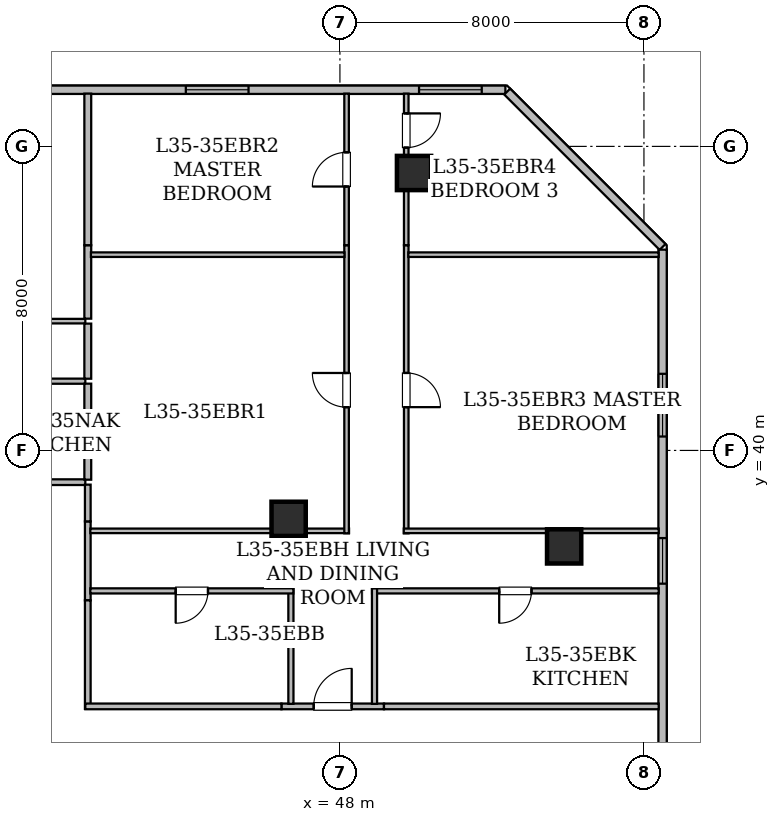
"""IFC4 building model, lengths in metres.
Left out: names, types, materials, properties, quantities, classifications, styles, units other than length and angle.
Written with IfcOpenShell. Run it as: python <this file> out.ifc"""

import sys

from ifc_helpers import new_model, si_unit, direction, frame, frame_2d, origin, origin_2d, place, context, subcontext, project, spatial, rectangle, hollow_rectangle, extrude, element, fill, save


model = new_model("IFC4")
c1 = context("Model", 3, precision=1e-05, world=origin(), true_north=direction((0.0, 1.0)))
c2 = subcontext(c1, "Body", "Model", "MODEL_VIEW")
j1 = project(units=[si_unit("LENGTHUNIT", "METRE"), si_unit("PLANEANGLEUNIT", "RADIAN")], contexts=[c1])
p1 = place(None, origin())
s1 = spatial("IfcSite", under=j1, at=p1, CompositionType="ELEMENT")
p2 = place(p1, origin())
s2 = spatial("IfcBuilding", under=s1, at=p2, CompositionType="ELEMENT")
p3 = place(p2, frame((0.0, 0.0, 138.4)))
s3 = spatial("IfcBuildingStorey", under=s2, at=p3, CompositionType="ELEMENT", Elevation=138.4)
for number, where, z_axis, x_axis in (
    (1, (49.95, 47.3, 0.0), (0.0, 0.0, 1.0), (1.0, 0.0, 0.0)),
    (2, (53.9, 37.475, 0.0), (0.0, 0.0, 1.0), (1.0, 0.0, 0.0)),
    (3, (46.65, 38.2, 0.0), (0.0, 0.0, 1.0), (1.0, 0.0, 0.0)),
):
    element("IfcColumn", number, at=place(p3, frame(where, z_axis=z_axis, x_axis=x_axis)), inside=s3, PredefinedType="COLUMN", context=c2, shape_type="SweptSolid", body=[
        extrude(hollow_rectangle(XDim=0.9, YDim=0.9, WallThickness=0.045, at=origin_2d()), origin(), (0.0, 0.0, 1.0), 3.65),
    ])
p4 = place(p3, frame((13.715, 49.49, 0.0), z_axis=(0.0, 0.0, 1.0), x_axis=(1.0, 0.0, 0.0)))
e4 = element("IfcWall", 4, at=p4, inside=s3, PredefinedType="STANDARD", context=c2, shape_type="SweptSolid", body=[
    extrude(rectangle(XDim=38.639, YDim=0.22, at=frame_2d((19.319, 0.0))), origin(), (0.0, 0.0, 1.0), 3.43),
])
p5 = place(p4, frame((2.243, 0.0, 0.85)))
e5 = element("IfcOpeningElement", 5, at=p5, cuts=e4, PredefinedType="OPENING", context=c2, shape_type="SweptSolid", body=[
    extrude(rectangle(XDim=1.65, YDim=1.55, at=frame_2d((0.825, 0.775))), frame((0.0, 0.12, 0.0), z_axis=(0.0, -1.0, 0.0), x_axis=(1.0, 0.0, 0.0)), (0.0, 0.0, 1.0), 0.24),
])
p6 = place(p4, frame((8.455, 0.0, 0.8)))
e6 = element("IfcOpeningElement", 6, at=p6, cuts=e4, PredefinedType="OPENING", context=c2, shape_type="SweptSolid", body=[
    extrude(rectangle(XDim=1.2, YDim=1.5, at=frame_2d((0.6, 0.75))), frame((0.0, 0.12, 0.0), z_axis=(0.0, -1.0, 0.0), x_axis=(1.0, 0.0, 0.0)), (0.0, 0.0, 1.0), 0.24),
])
p7 = place(p4, frame((5.805, 0.0, 0.85)))
e7 = element("IfcOpeningElement", 7, at=p7, cuts=e4, PredefinedType="OPENING", context=c2, shape_type="SweptSolid", body=[
    extrude(rectangle(XDim=1.65, YDim=1.55, at=frame_2d((0.825, 0.775))), frame((0.0, 0.12, 0.0), z_axis=(0.0, -1.0, 0.0), x_axis=(1.0, 0.0, 0.0)), (0.0, 0.0, 1.0), 0.24),
])
p8 = place(p4, frame((10.655, 0.0, 0.85)))
e8 = element("IfcOpeningElement", 8, at=p8, cuts=e4, PredefinedType="OPENING", context=c2, shape_type="SweptSolid", body=[
    extrude(rectangle(XDim=1.65, YDim=1.55, at=frame_2d((0.825, 0.775))), frame((0.0, 0.12, 0.0), z_axis=(0.0, -1.0, 0.0), x_axis=(1.0, 0.0, 0.0)), (0.0, 0.0, 1.0), 0.24),
])
p9 = place(p4, frame((16.851, 0.0, 0.85)))
e9 = element("IfcOpeningElement", 9, at=p9, cuts=e4, PredefinedType="OPENING", context=c2, shape_type="SweptSolid", body=[
    extrude(rectangle(XDim=1.65, YDim=1.55, at=frame_2d((0.825, 0.775))), frame((0.0, 0.12, 0.0), z_axis=(0.0, -1.0, 0.0), x_axis=(1.0, 0.0, 0.0)), (0.0, 0.0, 1.0), 0.24),
])
p10 = place(p4, frame((24.116, 0.0, 0.85)))
e10 = element("IfcOpeningElement", 10, at=p10, cuts=e4, PredefinedType="OPENING", context=c2, shape_type="SweptSolid", body=[
    extrude(rectangle(XDim=1.65, YDim=1.55, at=frame_2d((0.825, 0.775))), frame((0.0, 0.12, 0.0), z_axis=(0.0, -1.0, 0.0), x_axis=(1.0, 0.0, 0.0)), (0.0, 0.0, 1.0), 0.24),
])
p11 = place(p4, frame((30.23, 0.0, 0.85)))
e11 = element("IfcOpeningElement", 11, at=p11, cuts=e4, PredefinedType="OPENING", context=c2, shape_type="SweptSolid", body=[
    extrude(rectangle(XDim=1.65, YDim=1.55, at=frame_2d((0.825, 0.775))), frame((0.0, 0.12, 0.0), z_axis=(0.0, -1.0, 0.0), x_axis=(1.0, 0.0, 0.0)), (0.0, 0.0, 1.0), 0.24),
])
p12 = place(p4, frame((36.367, 0.0, 0.85)))
e12 = element("IfcOpeningElement", 12, at=p12, cuts=e4, PredefinedType="OPENING", context=c2, shape_type="SweptSolid", body=[
    extrude(rectangle(XDim=1.65, YDim=1.55, at=frame_2d((0.825, 0.775))), frame((0.0, 0.12, 0.0), z_axis=(0.0, -1.0, 0.0), x_axis=(1.0, 0.0, 0.0)), (0.0, 0.0, 1.0), 0.24),
])
p13 = place(p3, frame((52.402, 49.442, 0.0), z_axis=(0.0, 0.0, 1.0), x_axis=(0.707106781187, -0.707106781187, 0.0)))
e13 = element("IfcWall", 13, at=p13, inside=s3, PredefinedType="STANDARD", context=c2, shape_type="SweptSolid", body=[
    extrude(rectangle(XDim=5.781, YDim=0.22, at=frame_2d((2.891, 0.0))), origin(), (0.0, 0.0, 1.0), 3.43),
])
p14 = place(p3, frame((56.49, 45.283, 0.0), z_axis=(0.0, 0.0, 1.0), x_axis=(0.0, -1.0, 0.0)))
e14 = element("IfcWall", 14, at=p14, inside=s3, PredefinedType="STANDARD", context=c2, shape_type="SweptSolid", body=[
    extrude(rectangle(XDim=14.046, YDim=0.22, at=frame_2d((7.023, 0.0))), origin(), (0.0, 0.0, 1.0), 3.43),
])
p15 = place(p14, frame((7.589, 0.0, 0.8)))
e15 = element("IfcOpeningElement", 15, at=p15, cuts=e14, PredefinedType="OPENING", context=c2, shape_type="SweptSolid", body=[
    extrude(rectangle(XDim=1.2, YDim=1.5, at=frame_2d((0.6, 0.75))), frame((0.0, 0.12, 0.0), z_axis=(0.0, -1.0, 0.0), x_axis=(1.0, 0.0, 0.0)), (0.0, 0.0, 1.0), 0.24),
])
p16 = place(p14, frame((3.267, 0.0, 0.85)))
e16 = element("IfcOpeningElement", 16, at=p16, cuts=e14, PredefinedType="OPENING", context=c2, shape_type="SweptSolid", body=[
    extrude(rectangle(XDim=1.65, YDim=1.55, at=frame_2d((0.825, 0.775))), frame((0.0, 0.12, 0.0), z_axis=(0.0, -1.0, 0.0), x_axis=(1.0, 0.0, 0.0)), (0.0, 0.0, 1.0), 0.24),
])
p17 = place(p3, frame((34.299, 39.165, 0.0), z_axis=(0.0, 0.0, 1.0), x_axis=(1.0, 0.0, 0.0)))
e17 = element("IfcWall", 17, at=p17, inside=s3, PredefinedType="STANDARD", context=c2, shape_type="SweptSolid", body=[
    extrude(rectangle(XDim=7.001, YDim=0.15, at=frame_2d((3.5, 0.0))), origin(), (0.0, 0.0, 1.0), 2.647),
])
p18 = place(p3, frame((41.365, 38.133, 0.0), z_axis=(0.0, 0.0, 1.0), x_axis=(0.0, -1.0, 0.0)))
e18 = element("IfcWall", 18, at=p18, inside=s3, PredefinedType="STANDARD", context=c2, shape_type="SweptSolid", body=[
    extrude(rectangle(XDim=2.078, YDim=0.15, at=frame_2d((1.039, 0.0))), origin(), (0.0, 0.0, 1.0), 2.647),
])
p19 = place(p3, frame((46.461, 33.265, 0.0), z_axis=(0.0, 0.0, 1.0), x_axis=(1.0, 0.0, 0.0)))
e19 = element("IfcWall", 19, at=p19, inside=s3, PredefinedType="STANDARD", context=c2, shape_type="SweptSolid", body=[
    extrude(rectangle(XDim=2.698, YDim=0.15, at=frame_2d((1.349, 0.0))), origin(), (0.0, 0.0, 1.0), 2.647),
])
p20 = place(p19, frame((0.849, 0.0, 0.0)))
e20 = element("IfcOpeningElement", 20, at=p20, cuts=e19, PredefinedType="OPENING", context=c2, shape_type="SweptSolid", body=[
    extrude(rectangle(XDim=1.0, YDim=2.15, at=frame_2d((0.5, 1.075))), frame((0.0, 0.085, 0.0), z_axis=(0.0, -1.0, 0.0), x_axis=(1.0, 0.0, 0.0)), (0.0, 0.0, 1.0), 0.17),
])
p21 = place(p3, frame((41.365, 36.055, 0.0), z_axis=(0.0, 0.0, 1.0), x_axis=(0.0, -1.0, 0.0)))
e21 = element("IfcWall", 21, at=p21, inside=s3, PredefinedType="STANDARD", context=c2, shape_type="SweptSolid", body=[
    extrude(rectangle(XDim=2.855, YDim=0.15, at=frame_2d((1.427, 0.0))), origin(), (0.0, 0.0, 1.0), 3.43),
])
p22 = place(p3, frame((41.3, 33.265, 0.0), z_axis=(0.0, 0.0, 1.0), x_axis=(1.0, 0.0, 0.0)))
e22 = element("IfcWall", 22, at=p22, inside=s3, PredefinedType="STANDARD", context=c2, shape_type="SweptSolid", body=[
    extrude(rectangle(XDim=5.161, YDim=0.15, at=frame_2d((2.581, 0.0))), origin(), (0.0, 0.0, 1.0), 2.647),
])
p23 = place(p3, frame((49.159, 33.265, 0.0), z_axis=(0.0, 0.0, 1.0), x_axis=(1.0, 0.0, 0.0)))
e23 = element("IfcWall", 23, at=p23, inside=s3, PredefinedType="STANDARD", context=c2, shape_type="SweptSolid", body=[
    extrude(rectangle(XDim=7.229, YDim=0.15, at=frame_2d((3.615, 0.0))), origin(), (0.0, 0.0, 1.0), 2.876),
])
p24 = place(p3, frame((41.365, 39.1, 0.0), z_axis=(0.0, 0.0, 1.0), x_axis=(0.0, -1.0, 0.0)))
e24 = element("IfcWall", 24, at=p24, inside=s3, PredefinedType="STANDARD", context=c2, shape_type="SweptSolid", body=[
    extrude(rectangle(XDim=0.967, YDim=0.15, at=frame_2d((0.483, 0.0))), origin(), (0.0, 0.0, 1.0), 3.43),
])
p25 = place(p3, frame((41.3, 41.822, 0.0), z_axis=(0.0, 0.0, 1.0), x_axis=(-1.0, 0.0, 0.0)))
e25 = element("IfcWall", 25, at=p25, inside=s3, PredefinedType="PARTITIONING", context=c2, shape_type="SweptSolid", body=[
    extrude(rectangle(XDim=7.315, YDim=0.135, at=frame_2d((3.657, 0.0))), origin(), (0.0, 0.0, 1.0), 2.647),
])
p26 = place(p25, frame((3.233, 0.0, 0.0)))
e26 = element("IfcOpeningElement", 26, at=p26, cuts=e25, PredefinedType="OPENING", context=c2, shape_type="SweptSolid", body=[
    extrude(rectangle(XDim=0.85, YDim=2.1, at=frame_2d((0.425, 1.05))), frame((0.0, 0.077, 0.0), z_axis=(0.0, -1.0, 0.0), x_axis=(1.0, 0.0, 0.0)), (0.0, 0.0, 1.0), 0.155),
])
p27 = place(p3, frame((36.196, 43.402, 0.0), z_axis=(0.0, 0.0, 1.0), x_axis=(1.0, 0.0, 0.0)))
e27 = element("IfcWall", 27, at=p27, inside=s3, PredefinedType="PARTITIONING", context=c2, shape_type="SweptSolid", body=[
    extrude(rectangle(XDim=5.104, YDim=0.12, at=frame_2d((2.552, 0.0))), origin(), (0.0, 0.0, 1.0), 2.647),
])
p28 = place(p27, frame((2.102, 0.0, 0.0)))
e28 = element("IfcOpeningElement", 28, at=p28, cuts=e27, PredefinedType="OPENING", context=c2, shape_type="SweptSolid", body=[
    extrude(rectangle(XDim=0.9, YDim=2.1, at=frame_2d((0.45, 1.05))), frame((0.0, 0.07, 0.0), z_axis=(0.0, -1.0, 0.0), x_axis=(1.0, 0.0, 0.0)), (0.0, 0.0, 1.0), 0.14),
])
p29 = place(p3, frame((41.365, 43.337, 0.0), z_axis=(0.0, 0.0, 1.0), x_axis=(0.0, -1.0, 0.0)))
e29 = element("IfcWall", 29, at=p29, inside=s3, PredefinedType="STANDARD", context=c2, shape_type="SweptSolid", body=[
    extrude(rectangle(XDim=1.45, YDim=0.18, at=frame_2d((0.725, 0.0))), origin(), (0.0, 0.0, 1.0), 3.43),
])
p30 = place(p3, frame((41.365, 41.757, 0.0), z_axis=(0.0, 0.0, 1.0), x_axis=(0.0, -1.0, 0.0)))
e30 = element("IfcWall", 30, at=p30, inside=s3, PredefinedType="STANDARD", context=c2, shape_type="SweptSolid", body=[
    extrude(rectangle(XDim=2.527, YDim=0.18, at=frame_2d((1.264, 0.0))), origin(), (0.0, 0.0, 1.0), 3.43),
])
p31 = place(p3, frame((41.365, 45.4, 0.0), z_axis=(0.0, 0.0, 1.0), x_axis=(0.0, -1.0, 0.0)))
e31 = element("IfcWall", 31, at=p31, inside=s3, PredefinedType="STANDARD", context=c2, shape_type="SweptSolid", body=[
    extrude(rectangle(XDim=1.933, YDim=0.18, at=frame_2d((0.966, 0.0))), origin(), (0.0, 0.0, 1.0), 3.43),
])
p32 = place(p3, frame((41.365, 49.388, 0.0), z_axis=(0.0, 0.0, 1.0), x_axis=(0.0, -1.0, 0.0)))
e32 = element("IfcWall", 32, at=p32, inside=s3, PredefinedType="STANDARD", context=c2, shape_type="SweptSolid", body=[
    extrude(rectangle(XDim=3.988, YDim=0.18, at=frame_2d((1.994, 0.0))), origin(), (0.0, 0.0, 1.0), 2.876),
])
p33 = place(p3, frame((46.71, 33.332, 0.0), z_axis=(0.0, 0.0, 1.0), x_axis=(0.0, 1.0, 0.0)))
e33 = element("IfcWall", 33, at=p33, inside=s3, PredefinedType="PARTITIONING", context=c2, shape_type="SweptSolid", body=[
    extrude(rectangle(XDim=3.037, YDim=0.135, at=frame_2d((1.519, 0.0))), origin(), (0.0, 0.0, 1.0), 2.647),
])
p34 = place(p3, frame((46.775, 36.304, 0.0), z_axis=(0.0, 0.0, 1.0), x_axis=(-1.0, 0.0, 0.0)))
e34 = element("IfcWall", 34, at=p34, inside=s3, PredefinedType="PARTITIONING", context=c2, shape_type="SweptSolid", body=[
    extrude(rectangle(XDim=5.343, YDim=0.135, at=frame_2d((2.671, 0.0))), origin(), (0.0, 0.0, 1.0), 2.647),
])
p35 = place(p34, frame((2.247, 0.0, 0.0)))
e35 = element("IfcOpeningElement", 35, at=p35, cuts=e34, PredefinedType="OPENING", context=c2, shape_type="SweptSolid", body=[
    extrude(rectangle(XDim=0.85, YDim=2.1, at=frame_2d((0.425, 1.05))), frame((0.0, 0.077, 0.0), z_axis=(0.0, -1.0, 0.0), x_axis=(1.0, 0.0, 0.0)), (0.0, 0.0, 1.0), 0.155),
])
p36 = place(p3, frame((56.388, 36.304, 0.0), z_axis=(0.0, 0.0, 1.0), x_axis=(-1.0, 0.0, 0.0)))
e36 = element("IfcWall", 36, at=p36, inside=s3, PredefinedType="PARTITIONING", context=c2, shape_type="SweptSolid", body=[
    extrude(rectangle(XDim=7.543, YDim=0.135, at=frame_2d((3.771, 0.0))), origin(), (0.0, 0.0, 1.0), 2.876),
])
p37 = place(p36, frame((3.347, 0.0, 0.0)))
e37 = element("IfcOpeningElement", 37, at=p37, cuts=e36, PredefinedType="OPENING", context=c2, shape_type="SweptSolid", body=[
    extrude(rectangle(XDim=0.85, YDim=2.1, at=frame_2d((0.425, 1.05))), frame((0.0, 0.077, 0.0), z_axis=(0.0, -1.0, 0.0), x_axis=(1.0, 0.0, 0.0)), (0.0, 0.0, 1.0), 0.155),
])
p38 = place(p3, frame((48.91, 36.369, 0.0), z_axis=(0.0, 0.0, 1.0), x_axis=(0.0, -1.0, 0.0)))
e38 = element("IfcWall", 38, at=p38, inside=s3, PredefinedType="PARTITIONING", context=c2, shape_type="SweptSolid", body=[
    extrude(rectangle(XDim=3.037, YDim=0.135, at=frame_2d((1.519, 0.0))), origin(), (0.0, 0.0, 1.0), 3.43),
])
p39 = place(p3, frame((41.432, 37.884, 0.0), z_axis=(0.0, 0.0, 1.0), x_axis=(1.0, 0.0, 0.0)))
e39 = element("IfcWall", 39, at=p39, inside=s3, PredefinedType="PARTITIONING", context=c2, shape_type="SweptSolid", body=[
    extrude(rectangle(XDim=6.808, YDim=0.12, at=frame_2d((3.404, 0.0))), origin(), (0.0, 0.0, 1.0), 2.647),
])
p40 = place(p3, frame((48.175, 37.819, 0.0), z_axis=(0.0, 0.0, 1.0), x_axis=(0.0, 1.0, 0.0)))
e40 = element("IfcWall", 40, at=p40, inside=s3, PredefinedType="PARTITIONING", context=c2, shape_type="SweptSolid", body=[
    extrude(rectangle(XDim=7.581, YDim=0.12, at=frame_2d((3.791, 0.0))), origin(), (0.0, 0.0, 1.0), 2.647),
])
p41 = place(p40, frame((3.319, 0.0, 0.0)))
e41 = element("IfcOpeningElement", 41, at=p41, cuts=e40, PredefinedType="OPENING", context=c2, shape_type="SweptSolid", body=[
    extrude(rectangle(XDim=0.9, YDim=2.1, at=frame_2d((0.45, 1.05))), frame((0.0, 0.07, 0.0), z_axis=(0.0, -1.0, 0.0), x_axis=(1.0, 0.0, 0.0)), (0.0, 0.0, 1.0), 0.14),
])
p42 = place(p3, frame((48.175, 45.4, 0.0), z_axis=(0.0, 0.0, 1.0), x_axis=(0.0, 1.0, 0.0)))
e42 = element("IfcWall", 42, at=p42, inside=s3, PredefinedType="PARTITIONING", context=c2, shape_type="SweptSolid", body=[
    extrude(rectangle(XDim=3.988, YDim=0.12, at=frame_2d((1.994, 0.0))), origin(), (0.0, 0.0, 1.0), 2.876),
])
p43 = place(p42, frame((1.544, 0.0, 0.0)))
e43 = element("IfcOpeningElement", 43, at=p43, cuts=e42, PredefinedType="OPENING", context=c2, shape_type="SweptSolid", body=[
    extrude(rectangle(XDim=0.9, YDim=2.1, at=frame_2d((0.45, 1.05))), frame((0.0, 0.07, 0.0), z_axis=(0.0, -1.0, 0.0), x_axis=(1.0, 0.0, 0.0)), (0.0, 0.0, 1.0), 0.14),
])
p44 = place(p3, frame((49.745, 45.4, 0.0), z_axis=(0.0, 0.0, 1.0), x_axis=(0.0, -1.0, 0.0)))
e44 = element("IfcWall", 44, at=p44, inside=s3, PredefinedType="PARTITIONING", context=c2, shape_type="SweptSolid", body=[
    extrude(rectangle(XDim=7.581, YDim=0.12, at=frame_2d((3.791, 0.0))), origin(), (0.0, 0.0, 1.0), 2.647),
])
p45 = place(p44, frame((3.361, 0.0, 0.0)))
e45 = element("IfcOpeningElement", 45, at=p45, cuts=e44, PredefinedType="OPENING", context=c2, shape_type="SweptSolid", body=[
    extrude(rectangle(XDim=0.9, YDim=2.1, at=frame_2d((0.45, 1.05))), frame((0.0, 0.07, 0.0), z_axis=(0.0, -1.0, 0.0), x_axis=(1.0, 0.0, 0.0)), (0.0, 0.0, 1.0), 0.14),
])
p46 = place(p3, frame((49.68, 37.884, 0.0), z_axis=(0.0, 0.0, 1.0), x_axis=(1.0, 0.0, 0.0)))
e46 = element("IfcWall", 46, at=p46, inside=s3, PredefinedType="PARTITIONING", context=c2, shape_type="SweptSolid", body=[
    extrude(rectangle(XDim=6.708, YDim=0.12, at=frame_2d((3.354, 0.0))), origin(), (0.0, 0.0, 1.0), 2.647),
])
p47 = place(p3, frame((49.745, 49.388, 0.0), z_axis=(0.0, 0.0, 1.0), x_axis=(0.0, -1.0, 0.0)))
e47 = element("IfcWall", 47, at=p47, inside=s3, PredefinedType="PARTITIONING", context=c2, shape_type="SweptSolid", body=[
    extrude(rectangle(XDim=3.988, YDim=0.12, at=frame_2d((1.994, 0.0))), origin(), (0.0, 0.0, 1.0), 2.647),
])
p48 = place(p47, frame((0.52, 0.0, 0.0)))
e48 = element("IfcOpeningElement", 48, at=p48, cuts=e47, PredefinedType="OPENING", context=c2, shape_type="SweptSolid", body=[
    extrude(rectangle(XDim=0.9, YDim=2.1, at=frame_2d((0.45, 1.05))), frame((0.0, 0.07, 0.0), z_axis=(0.0, -1.0, 0.0), x_axis=(1.0, 0.0, 0.0)), (0.0, 0.0, 1.0), 0.14),
])
p49 = place(p3, frame((41.447, 45.151, 0.0), z_axis=(0.0, 0.0, 1.0), x_axis=(1.0, 0.0, 0.0)))
e49 = element("IfcWall", 49, at=p49, inside=s3, PredefinedType="PARTITIONING", context=c2, shape_type="SweptSolid", body=[
    extrude(rectangle(XDim=6.674, YDim=0.12, at=frame_2d((3.337, 0.0))), origin(), (0.0, 0.0, 1.0), 3.43),
])
p50 = place(p3, frame((49.799, 45.151, 0.0), z_axis=(0.0, 0.0, 1.0), x_axis=(1.0, 0.0, 0.0)))
e50 = element("IfcWall", 50, at=p50, inside=s3, PredefinedType="PARTITIONING", context=c2, shape_type="SweptSolid", body=[
    extrude(rectangle(XDim=6.589, YDim=0.12, at=frame_2d((3.294, 0.0))), origin(), (0.0, 0.0, 1.0), 2.876),
])
p51 = place(p15, origin())
e51 = element("IfcWindow", 51, at=p51, inside=s3, PartitioningType="SINGLE_PANEL", PredefinedType="WINDOW", context=c2, shape_type="SweptSolid", body=[
    extrude(rectangle(XDim=1.2, YDim=1.5, at=frame_2d((0.6, 0.75))), frame((0.0, 0.03, 0.0), z_axis=(0.0, -1.0, 0.0), x_axis=(1.0, 0.0, 0.0)), (0.0, 0.0, 1.0), 0.06),
])
fill(e15, e51)
p52 = place(p11, origin())
e52 = element("IfcWindow", 52, at=p52, inside=s3, PartitioningType="SINGLE_PANEL", PredefinedType="WINDOW", context=c2, shape_type="SweptSolid", body=[
    extrude(rectangle(XDim=1.65, YDim=1.55, at=frame_2d((0.825, 0.775))), frame((0.0, 0.03, 0.0), z_axis=(0.0, -1.0, 0.0), x_axis=(1.0, 0.0, 0.0)), (0.0, 0.0, 1.0), 0.06),
])
fill(e11, e52)
p53 = place(p16, origin())
e53 = element("IfcWindow", 53, at=p53, inside=s3, PartitioningType="SINGLE_PANEL", PredefinedType="WINDOW", context=c2, shape_type="SweptSolid", body=[
    extrude(rectangle(XDim=1.65, YDim=1.55, at=frame_2d((0.825, 0.775))), frame((0.0, 0.03, 0.0), z_axis=(0.0, -1.0, 0.0), x_axis=(1.0, 0.0, 0.0)), (0.0, 0.0, 1.0), 0.06),
])
fill(e16, e53)
p54 = place(p12, origin())
e54 = element("IfcWindow", 54, at=p54, inside=s3, PartitioningType="SINGLE_PANEL", PredefinedType="WINDOW", context=c2, shape_type="SweptSolid", body=[
    extrude(rectangle(XDim=1.65, YDim=1.55, at=frame_2d((0.825, 0.775))), frame((0.0, 0.03, 0.0), z_axis=(0.0, -1.0, 0.0), x_axis=(1.0, 0.0, 0.0)), (0.0, 0.0, 1.0), 0.06),
])
fill(e12, e54)
p55 = place(p20, origin())
e55 = element("IfcDoor", 55, at=p55, inside=s3, OperationType="SINGLE_SWING_RIGHT", PredefinedType="DOOR", context=c2, shape_type="SweptSolid", body=[
    extrude(rectangle(XDim=1.0, YDim=2.15, at=frame_2d((0.5, 1.075))), frame((0.0, 0.025, 0.0), z_axis=(0.0, -1.0, 0.0), x_axis=(1.0, 0.0, 0.0)), (0.0, 0.0, 1.0), 0.05),
])
fill(e20, e55)
p56 = place(p35, origin())
e56 = element("IfcDoor", 56, at=p56, inside=s3, OperationType="SINGLE_SWING_RIGHT", PredefinedType="DOOR", context=c2, shape_type="SweptSolid", body=[
    extrude(rectangle(XDim=0.85, YDim=2.1, at=frame_2d((0.425, 1.05))), frame((0.0, 0.025, 0.0), z_axis=(0.0, -1.0, 0.0), x_axis=(1.0, 0.0, 0.0)), (0.0, 0.0, 1.0), 0.05),
])
fill(e35, e56)
p57 = place(p37, origin())
e57 = element("IfcDoor", 57, at=p57, inside=s3, OperationType="SINGLE_SWING_RIGHT", PredefinedType="DOOR", context=c2, shape_type="SweptSolid", body=[
    extrude(rectangle(XDim=0.85, YDim=2.1, at=frame_2d((0.425, 1.05))), frame((0.0, 0.025, 0.0), z_axis=(0.0, -1.0, 0.0), x_axis=(1.0, 0.0, 0.0)), (0.0, 0.0, 1.0), 0.05),
])
fill(e37, e57)
p58 = place(p41, origin())
e58 = element("IfcDoor", 58, at=p58, inside=s3, OperationType="SINGLE_SWING_RIGHT", PredefinedType="DOOR", context=c2, shape_type="SweptSolid", body=[
    extrude(rectangle(XDim=0.9, YDim=2.1, at=frame_2d((0.45, 1.05))), frame((0.0, 0.025, 0.0), z_axis=(0.0, -1.0, 0.0), x_axis=(1.0, 0.0, 0.0)), (0.0, 0.0, 1.0), 0.05),
])
fill(e41, e58)
p59 = place(p43, origin())
e59 = element("IfcDoor", 59, at=p59, inside=s3, OperationType="SINGLE_SWING_LEFT", PredefinedType="DOOR", context=c2, shape_type="SweptSolid", body=[
    extrude(rectangle(XDim=0.9, YDim=2.1, at=frame_2d((0.45, 1.05))), frame((0.0, 0.025, 0.0), z_axis=(0.0, -1.0, 0.0), x_axis=(1.0, 0.0, 0.0)), (0.0, 0.0, 1.0), 0.05),
])
fill(e43, e59)
p60 = place(p45, origin())
e60 = element("IfcDoor", 60, at=p60, inside=s3, OperationType="SINGLE_SWING_RIGHT", PredefinedType="DOOR", context=c2, shape_type="SweptSolid", body=[
    extrude(rectangle(XDim=0.9, YDim=2.1, at=frame_2d((0.45, 1.05))), frame((0.0, 0.025, 0.0), z_axis=(0.0, -1.0, 0.0), x_axis=(1.0, 0.0, 0.0)), (0.0, 0.0, 1.0), 0.05),
])
fill(e45, e60)
p61 = place(p48, origin())
e61 = element("IfcDoor", 61, at=p61, inside=s3, OperationType="SINGLE_SWING_LEFT", PredefinedType="DOOR", context=c2, shape_type="SweptSolid", body=[
    extrude(rectangle(XDim=0.9, YDim=2.1, at=frame_2d((0.45, 1.05))), frame((0.0, 0.025, 0.0), z_axis=(0.0, -1.0, 0.0), x_axis=(1.0, 0.0, 0.0)), (0.0, 0.0, 1.0), 0.05),
])
fill(e48, e61)
save(model, sys.argv[1])
